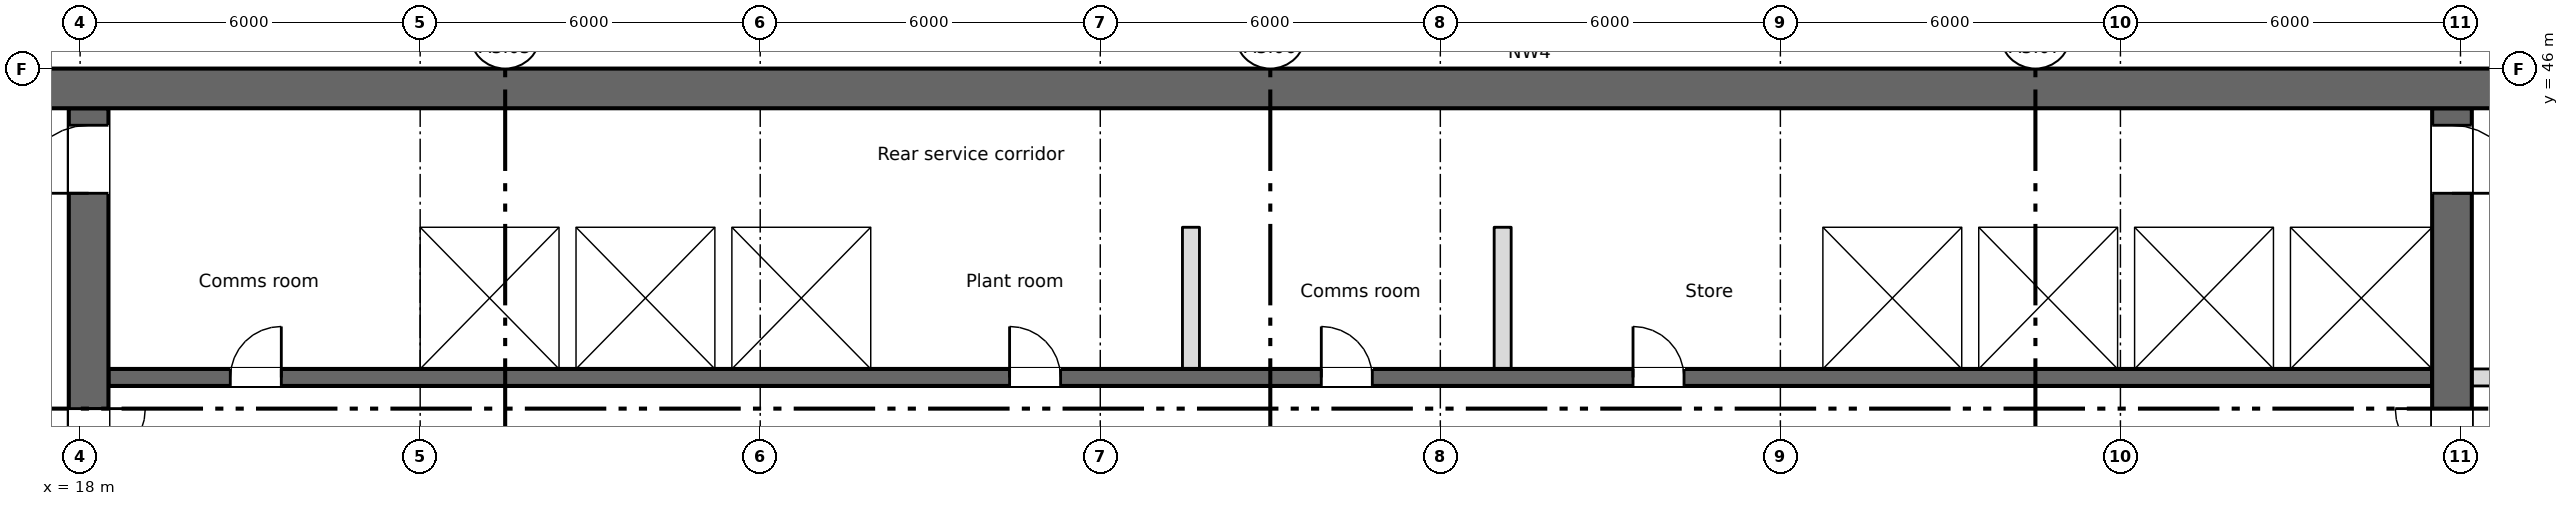
"""IFC4 building model, lengths in metres.
Left out: names, types, materials, properties, quantities, classifications, styles, units other than length and angle.
Written with IfcOpenShell. Run it as: python <this file> out.ifc"""

import sys

from ifc_helpers import new_model, si_unit, direction, frame, frame_2d, origin, place, context, subcontext, project, spatial, rectangle, extrude, element, fill, save


model = new_model("IFC4")
c1 = context("Model", 3, precision=1e-05, world=origin(), true_north=direction((0.0, 1.0)))
c2 = subcontext(c1, "Body", "Model", "MODEL_VIEW")
j1 = project(units=[si_unit("LENGTHUNIT", "METRE"), si_unit("PLANEANGLEUNIT", "RADIAN")], contexts=[c1])
p1 = place(None, origin())
s1 = spatial("IfcSite", under=j1, at=p1, CompositionType="ELEMENT")
p2 = place(p1, origin())
s2 = spatial("IfcBuilding", under=s1, at=p2, CompositionType="ELEMENT")
p3 = place(p2, frame((0.0, 0.0, 181.75)))
s3 = spatial("IfcBuildingStorey", under=s2, at=p3, CompositionType="ELEMENT", Elevation=181.75)
p4 = place(p3, frame((11.55, 45.65, 0.0), z_axis=(0.0, 0.0, 1.0), x_axis=(1.0, 0.0, 0.0)))
e1 = element("IfcWall", 1, at=p4, inside=s3, PredefinedType="SHEAR", context=c2, shape_type="SweptSolid", body=[
    extrude(rectangle(XDim=54.9, YDim=0.7, at=frame_2d((27.45, 0.0))), origin(), (0.0, 0.0, 1.0), 3.35),
])
p5 = place(p4, frame((1.2, 0.0, 0.6)))
e2 = element("IfcOpeningElement", 2, at=p5, cuts=e1, PredefinedType="OPENING", context=c2, shape_type="SweptSolid", body=[
    extrude(rectangle(XDim=0.6, YDim=2.4, at=frame_2d((0.3, 1.2))), frame((0.0, 0.36, 0.0), z_axis=(0.0, -1.0, 0.0), x_axis=(1.0, 0.0, 0.0)), (0.0, 0.0, 1.0), 0.72),
])
p6 = place(p4, frame((49.2, 0.0, 0.6)))
e3 = element("IfcOpeningElement", 3, at=p6, cuts=e1, PredefinedType="OPENING", context=c2, shape_type="SweptSolid", body=[
    extrude(rectangle(XDim=0.6, YDim=2.4, at=frame_2d((0.3, 1.2))), frame((0.0, 0.36, 0.0), z_axis=(0.0, -1.0, 0.0), x_axis=(1.0, 0.0, 0.0)), (0.0, 0.0, 1.0), 0.72),
])
p7 = place(p3, frame((18.15, 28.4, 0.0), z_axis=(0.0, 0.0, 1.0), x_axis=(0.0, 1.0, 0.0)))
e4 = element("IfcWall", 4, at=p7, inside=s3, PredefinedType="SHEAR", context=c2, shape_type="SweptSolid", body=[
    extrude(rectangle(XDim=16.9, YDim=0.7, at=frame_2d((8.45, 0.0))), origin(), (0.0, 0.0, 1.0), 3.35),
])
p8 = place(p7, frame((9.6, 0.0, 0.0)))
e5 = element("IfcOpeningElement", 5, at=p8, cuts=e4, PredefinedType="OPENING", context=c2, shape_type="SweptSolid", body=[
    extrude(rectangle(XDim=2.0, YDim=2.1, at=frame_2d((1.0, 1.05))), frame((0.0, 0.36, 0.0), z_axis=(0.0, -1.0, 0.0), x_axis=(1.0, 0.0, 0.0)), (0.0, 0.0, 1.0), 0.72),
])
p9 = place(p7, frame((15.4, 0.0, 0.0)))
e6 = element("IfcOpeningElement", 6, at=p9, cuts=e4, PredefinedType="OPENING", context=c2, shape_type="SweptSolid", body=[
    extrude(rectangle(XDim=1.2, YDim=2.1, at=frame_2d((0.6, 1.05))), frame((0.0, 0.36, 0.0), z_axis=(0.0, -1.0, 0.0), x_axis=(1.0, 0.0, 0.0)), (0.0, 0.0, 1.0), 0.72),
])
p10 = place(p3, frame((59.85, 28.4, 0.0), z_axis=(0.0, 0.0, 1.0), x_axis=(0.0, 1.0, 0.0)))
e7 = element("IfcWall", 7, at=p10, inside=s3, PredefinedType="SHEAR", context=c2, shape_type="SweptSolid", body=[
    extrude(rectangle(XDim=16.9, YDim=0.7, at=frame_2d((8.45, 0.0))), origin(), (0.0, 0.0, 1.0), 3.35),
])
p11 = place(p10, frame((9.6, 0.0, 0.0)))
e8 = element("IfcOpeningElement", 8, at=p11, cuts=e7, PredefinedType="OPENING", context=c2, shape_type="SweptSolid", body=[
    extrude(rectangle(XDim=2.0, YDim=2.1, at=frame_2d((1.0, 1.05))), frame((0.0, 0.36, 0.0), z_axis=(0.0, -1.0, 0.0), x_axis=(1.0, 0.0, 0.0)), (0.0, 0.0, 1.0), 0.72),
])
p12 = place(p10, frame((15.4, 0.0, 0.0)))
e9 = element("IfcOpeningElement", 9, at=p12, cuts=e7, PredefinedType="OPENING", context=c2, shape_type="SweptSolid", body=[
    extrude(rectangle(XDim=1.2, YDim=2.1, at=frame_2d((0.6, 1.05))), frame((0.0, 0.36, 0.0), z_axis=(0.0, -1.0, 0.0), x_axis=(1.0, 0.0, 0.0)), (0.0, 0.0, 1.0), 0.72),
])
p13 = place(p3, frame((18.5, 40.55, 0.0), z_axis=(0.0, 0.0, 1.0), x_axis=(1.0, 0.0, 0.0)))
e10 = element("IfcWall", 10, at=p13, inside=s3, PredefinedType="SHEAR", context=c2, shape_type="SweptSolid", body=[
    extrude(rectangle(XDim=41.0, YDim=0.3, at=frame_2d((20.5, 0.0))), origin(), (0.0, 0.0, 1.0), 3.35),
])
p14 = place(p13, frame((2.15, 0.0, 0.0)))
e11 = element("IfcOpeningElement", 11, at=p14, cuts=e10, PredefinedType="OPENING", context=c2, shape_type="SweptSolid", body=[
    extrude(rectangle(XDim=0.9, YDim=2.1, at=frame_2d((0.45, 1.05))), frame((0.0, 0.16, 0.0), z_axis=(0.0, -1.0, 0.0), x_axis=(1.0, 0.0, 0.0)), (0.0, 0.0, 1.0), 0.32),
])
p15 = place(p13, frame((15.9, 0.0, 0.0)))
e12 = element("IfcOpeningElement", 12, at=p15, cuts=e10, PredefinedType="OPENING", context=c2, shape_type="SweptSolid", body=[
    extrude(rectangle(XDim=0.9, YDim=2.1, at=frame_2d((0.45, 1.05))), frame((0.0, 0.16, 0.0), z_axis=(0.0, -1.0, 0.0), x_axis=(1.0, 0.0, 0.0)), (0.0, 0.0, 1.0), 0.32),
])
p16 = place(p13, frame((21.4, 0.0, 0.0)))
e13 = element("IfcOpeningElement", 13, at=p16, cuts=e10, PredefinedType="OPENING", context=c2, shape_type="SweptSolid", body=[
    extrude(rectangle(XDim=0.9, YDim=2.1, at=frame_2d((0.45, 1.05))), frame((0.0, 0.16, 0.0), z_axis=(0.0, -1.0, 0.0), x_axis=(1.0, 0.0, 0.0)), (0.0, 0.0, 1.0), 0.32),
])
p17 = place(p13, frame((26.9, 0.0, 0.0)))
e14 = element("IfcOpeningElement", 14, at=p17, cuts=e10, PredefinedType="OPENING", context=c2, shape_type="SweptSolid", body=[
    extrude(rectangle(XDim=0.9, YDim=2.1, at=frame_2d((0.45, 1.05))), frame((0.0, 0.16, 0.0), z_axis=(0.0, -1.0, 0.0), x_axis=(1.0, 0.0, 0.0)), (0.0, 0.0, 1.0), 0.32),
])
p18 = place(p13, frame((6.175, 0.0, 0.0)))
e15 = element("IfcOpeningElement", 15, at=p18, cuts=e10, PredefinedType="OPENING", context=c2, shape_type="SweptSolid", body=[
    extrude(rectangle(XDim=1.1, YDim=2.1, at=frame_2d((0.55, 1.05))), frame((0.0, 0.16, 0.0), z_axis=(0.0, -1.0, 0.0), x_axis=(1.0, 0.0, 0.0)), (0.0, 0.0, 1.0), 0.32),
])
p19 = place(p13, frame((8.925, 0.0, 0.0)))
e16 = element("IfcOpeningElement", 16, at=p19, cuts=e10, PredefinedType="OPENING", context=c2, shape_type="SweptSolid", body=[
    extrude(rectangle(XDim=1.1, YDim=2.1, at=frame_2d((0.55, 1.05))), frame((0.0, 0.16, 0.0), z_axis=(0.0, -1.0, 0.0), x_axis=(1.0, 0.0, 0.0)), (0.0, 0.0, 1.0), 0.32),
])
p20 = place(p13, frame((11.675, 0.0, 0.0)))
e17 = element("IfcOpeningElement", 17, at=p20, cuts=e10, PredefinedType="OPENING", context=c2, shape_type="SweptSolid", body=[
    extrude(rectangle(XDim=1.1, YDim=2.1, at=frame_2d((0.55, 1.05))), frame((0.0, 0.16, 0.0), z_axis=(0.0, -1.0, 0.0), x_axis=(1.0, 0.0, 0.0)), (0.0, 0.0, 1.0), 0.32),
])
p21 = place(p13, frame((30.925, 0.0, 0.0)))
e18 = element("IfcOpeningElement", 18, at=p21, cuts=e10, PredefinedType="OPENING", context=c2, shape_type="SweptSolid", body=[
    extrude(rectangle(XDim=1.1, YDim=2.1, at=frame_2d((0.55, 1.05))), frame((0.0, 0.16, 0.0), z_axis=(0.0, -1.0, 0.0), x_axis=(1.0, 0.0, 0.0)), (0.0, 0.0, 1.0), 0.32),
])
p22 = place(p13, frame((33.675, 0.0, 0.0)))
e19 = element("IfcOpeningElement", 19, at=p22, cuts=e10, PredefinedType="OPENING", context=c2, shape_type="SweptSolid", body=[
    extrude(rectangle(XDim=1.1, YDim=2.1, at=frame_2d((0.55, 1.05))), frame((0.0, 0.16, 0.0), z_axis=(0.0, -1.0, 0.0), x_axis=(1.0, 0.0, 0.0)), (0.0, 0.0, 1.0), 0.32),
])
p23 = place(p13, frame((36.375, 0.0, 0.0)))
e20 = element("IfcOpeningElement", 20, at=p23, cuts=e10, PredefinedType="OPENING", context=c2, shape_type="SweptSolid", body=[
    extrude(rectangle(XDim=1.2, YDim=2.1, at=frame_2d((0.6, 1.05))), frame((0.0, 0.16, 0.0), z_axis=(0.0, -1.0, 0.0), x_axis=(1.0, 0.0, 0.0)), (0.0, 0.0, 1.0), 0.32),
])
p24 = place(p13, frame((39.15, 0.0, 0.0)))
e21 = element("IfcOpeningElement", 21, at=p24, cuts=e10, PredefinedType="OPENING", context=c2, shape_type="SweptSolid", body=[
    extrude(rectangle(XDim=1.2, YDim=2.1, at=frame_2d((0.6, 1.05))), frame((0.0, 0.16, 0.0), z_axis=(0.0, -1.0, 0.0), x_axis=(1.0, 0.0, 0.0)), (0.0, 0.0, 1.0), 0.32),
])
p25 = place(p3, frame((18.5, 43.35, 0.0), z_axis=(0.0, 0.0, 1.0), x_axis=(1.0, 0.0, 0.0)))
e22 = element("IfcWall", 22, at=p25, inside=s3, PredefinedType="SHEAR", context=c2, shape_type="SweptSolid", body=[
    extrude(rectangle(XDim=41.0, YDim=0.3, at=frame_2d((20.5, 0.0))), origin(), (0.0, 0.0, 1.0), 3.35),
])
p26 = place(p3, frame((60.2, 40.55, 0.0), z_axis=(0.0, 0.0, 1.0), x_axis=(1.0, 0.0, 0.0)))
e23 = element("IfcWall", 23, at=p26, inside=s3, PredefinedType="PARTITIONING", context=c2, shape_type="SweptSolid", body=[
    extrude(rectangle(XDim=2.5, YDim=0.3, at=frame_2d((1.25, 0.0))), origin(), (0.0, 0.0, 1.0), 3.35),
])
p27 = place(p26, frame((0.725, 0.0, 0.0)))
e24 = element("IfcOpeningElement", 24, at=p27, cuts=e23, PredefinedType="OPENING", context=c2, shape_type="SweptSolid", body=[
    extrude(rectangle(XDim=0.9, YDim=2.1, at=frame_2d((0.45, 1.05))), frame((0.0, 0.16, 0.0), z_axis=(0.0, -1.0, 0.0), x_axis=(1.0, 0.0, 0.0)), (0.0, 0.0, 1.0), 0.32),
])
for number, where, z_axis, x_axis in (
    (25, (23.85, 40.7, 0.0), (0.0, 0.0, 1.0), (0.0, 1.0, 0.0)),
    (26, (26.6, 40.7, 0.0), (0.0, 0.0, 1.0), (0.0, 1.0, 0.0)),
    (27, (29.35, 40.7, 0.0), (0.0, 0.0, 1.0), (0.0, 1.0, 0.0)),
    (28, (32.1, 40.7, 0.0), (0.0, 0.0, 1.0), (0.0, 1.0, 0.0)),
    (29, (48.6, 40.7, 0.0), (0.0, 0.0, 1.0), (0.0, 1.0, 0.0)),
    (30, (51.35, 40.7, 0.0), (0.0, 0.0, 1.0), (0.0, 1.0, 0.0)),
    (31, (54.1, 40.7, 0.0), (0.0, 0.0, 1.0), (0.0, 1.0, 0.0)),
    (32, (56.85, 40.7, 0.0), (0.0, 0.0, 1.0), (0.0, 1.0, 0.0)),
):
    element("IfcWall", number, at=place(p3, frame(where, z_axis=z_axis, x_axis=x_axis)), inside=s3, PredefinedType="SHEAR", context=c2, shape_type="SweptSolid", body=[
        extrude(rectangle(XDim=2.5, YDim=0.3, at=frame_2d((1.25, 0.0))), origin(), (0.0, 0.0, 1.0), 3.35),
    ])
for number, where, z_axis, x_axis in (
    (33, (37.6, 40.7, 0.0), (0.0, 0.0, 1.0), (0.0, 1.0, 0.0)),
    (34, (43.1, 40.7, 0.0), (0.0, 0.0, 1.0), (0.0, 1.0, 0.0)),
):
    element("IfcWall", number, at=place(p3, frame(where, z_axis=z_axis, x_axis=x_axis)), inside=s3, PredefinedType="PARTITIONING", context=c2, shape_type="SweptSolid", body=[
        extrude(rectangle(XDim=2.5, YDim=0.3, at=frame_2d((1.25, 0.0))), origin(), (0.0, 0.0, 1.0), 3.35),
    ])
p28 = place(p14, origin())
e35 = element("IfcDoor", 35, at=p28, inside=s3, OperationType="SINGLE_SWING_RIGHT", PredefinedType="DOOR", context=c2, shape_type="SweptSolid", body=[
    extrude(rectangle(XDim=0.9, YDim=2.1, at=frame_2d((0.45, 1.05))), frame((0.0, 0.025, 0.0), z_axis=(0.0, -1.0, 0.0), x_axis=(1.0, 0.0, 0.0)), (0.0, 0.0, 1.0), 0.05),
])
fill(e11, e35)
p29 = place(p15, origin())
e36 = element("IfcDoor", 36, at=p29, inside=s3, OperationType="SINGLE_SWING_LEFT", PredefinedType="DOOR", context=c2, shape_type="SweptSolid", body=[
    extrude(rectangle(XDim=0.9, YDim=2.1, at=frame_2d((0.45, 1.05))), frame((0.0, 0.025, 0.0), z_axis=(0.0, -1.0, 0.0), x_axis=(1.0, 0.0, 0.0)), (0.0, 0.0, 1.0), 0.05),
])
fill(e12, e36)
p30 = place(p16, origin())
e37 = element("IfcDoor", 37, at=p30, inside=s3, OperationType="SINGLE_SWING_LEFT", PredefinedType="DOOR", context=c2, shape_type="SweptSolid", body=[
    extrude(rectangle(XDim=0.9, YDim=2.1, at=frame_2d((0.45, 1.05))), frame((0.0, 0.025, 0.0), z_axis=(0.0, -1.0, 0.0), x_axis=(1.0, 0.0, 0.0)), (0.0, 0.0, 1.0), 0.05),
])
fill(e13, e37)
p31 = place(p17, origin())
e38 = element("IfcDoor", 38, at=p31, inside=s3, OperationType="SINGLE_SWING_LEFT", PredefinedType="DOOR", context=c2, shape_type="SweptSolid", body=[
    extrude(rectangle(XDim=0.9, YDim=2.1, at=frame_2d((0.45, 1.05))), frame((0.0, 0.025, 0.0), z_axis=(0.0, -1.0, 0.0), x_axis=(1.0, 0.0, 0.0)), (0.0, 0.0, 1.0), 0.05),
])
fill(e14, e38)
p32 = place(p18, origin())
e39 = element("IfcDoor", 39, at=p32, inside=s3, OperationType="SLIDING_TO_LEFT", PredefinedType="DOOR", context=c2, shape_type="SweptSolid", body=[
    extrude(rectangle(XDim=1.1, YDim=2.1, at=frame_2d((0.55, 1.05))), frame((0.0, 0.025, 0.0), z_axis=(0.0, -1.0, 0.0), x_axis=(1.0, 0.0, 0.0)), (0.0, 0.0, 1.0), 0.05),
])
fill(e15, e39)
p33 = place(p19, origin())
e40 = element("IfcDoor", 40, at=p33, inside=s3, OperationType="SLIDING_TO_LEFT", PredefinedType="DOOR", context=c2, shape_type="SweptSolid", body=[
    extrude(rectangle(XDim=1.1, YDim=2.1, at=frame_2d((0.55, 1.05))), frame((0.0, 0.025, 0.0), z_axis=(0.0, -1.0, 0.0), x_axis=(1.0, 0.0, 0.0)), (0.0, 0.0, 1.0), 0.05),
])
fill(e16, e40)
p34 = place(p20, origin())
e41 = element("IfcDoor", 41, at=p34, inside=s3, OperationType="SLIDING_TO_LEFT", PredefinedType="DOOR", context=c2, shape_type="SweptSolid", body=[
    extrude(rectangle(XDim=1.1, YDim=2.1, at=frame_2d((0.55, 1.05))), frame((0.0, 0.025, 0.0), z_axis=(0.0, -1.0, 0.0), x_axis=(1.0, 0.0, 0.0)), (0.0, 0.0, 1.0), 0.05),
])
fill(e17, e41)
p35 = place(p21, origin())
e42 = element("IfcDoor", 42, at=p35, inside=s3, OperationType="SLIDING_TO_LEFT", PredefinedType="DOOR", context=c2, shape_type="SweptSolid", body=[
    extrude(rectangle(XDim=1.1, YDim=2.1, at=frame_2d((0.55, 1.05))), frame((0.0, 0.025, 0.0), z_axis=(0.0, -1.0, 0.0), x_axis=(1.0, 0.0, 0.0)), (0.0, 0.0, 1.0), 0.05),
])
fill(e18, e42)
p36 = place(p22, origin())
e43 = element("IfcDoor", 43, at=p36, inside=s3, OperationType="SLIDING_TO_LEFT", PredefinedType="DOOR", context=c2, shape_type="SweptSolid", body=[
    extrude(rectangle(XDim=1.1, YDim=2.1, at=frame_2d((0.55, 1.05))), frame((0.0, 0.025, 0.0), z_axis=(0.0, -1.0, 0.0), x_axis=(1.0, 0.0, 0.0)), (0.0, 0.0, 1.0), 0.05),
])
fill(e19, e43)
p37 = place(p23, origin())
e44 = element("IfcDoor", 44, at=p37, inside=s3, OperationType="SLIDING_TO_LEFT", PredefinedType="DOOR", context=c2, shape_type="SweptSolid", body=[
    extrude(rectangle(XDim=1.2, YDim=2.1, at=frame_2d((0.6, 1.05))), frame((0.0, 0.025, 0.0), z_axis=(0.0, -1.0, 0.0), x_axis=(1.0, 0.0, 0.0)), (0.0, 0.0, 1.0), 0.05),
])
fill(e20, e44)
p38 = place(p24, origin())
e45 = element("IfcDoor", 45, at=p38, inside=s3, OperationType="SLIDING_TO_LEFT", PredefinedType="DOOR", context=c2, shape_type="SweptSolid", body=[
    extrude(rectangle(XDim=1.2, YDim=2.1, at=frame_2d((0.6, 1.05))), frame((0.0, 0.025, 0.0), z_axis=(0.0, -1.0, 0.0), x_axis=(1.0, 0.0, 0.0)), (0.0, 0.0, 1.0), 0.05),
])
fill(e21, e45)
p39 = place(p8, origin())
e46 = element("IfcDoor", 46, at=p39, inside=s3, OperationType="DOUBLE_DOOR_SINGLE_SWING", PredefinedType="DOOR", context=c2, shape_type="SweptSolid", body=[
    extrude(rectangle(XDim=2.0, YDim=2.1, at=frame_2d((1.0, 1.05))), frame((0.0, 0.025, 0.0), z_axis=(0.0, -1.0, 0.0), x_axis=(1.0, 0.0, 0.0)), (0.0, 0.0, 1.0), 0.05),
])
fill(e5, e46)
p40 = place(p11, origin())
e47 = element("IfcDoor", 47, at=p40, inside=s3, OperationType="DOUBLE_DOOR_SINGLE_SWING", PredefinedType="DOOR", context=c2, shape_type="SweptSolid", body=[
    extrude(rectangle(XDim=2.0, YDim=2.1, at=frame_2d((1.0, 1.05))), frame((0.0, 0.025, 0.0), z_axis=(0.0, -1.0, 0.0), x_axis=(1.0, 0.0, 0.0)), (0.0, 0.0, 1.0), 0.05),
])
fill(e8, e47)
p41 = place(p9, origin())
e48 = element("IfcDoor", 48, at=p41, inside=s3, OperationType="SINGLE_SWING_LEFT", PredefinedType="DOOR", context=c2, shape_type="SweptSolid", body=[
    extrude(rectangle(XDim=1.2, YDim=2.1, at=frame_2d((0.6, 1.05))), frame((0.0, 0.025, 0.0), z_axis=(0.0, -1.0, 0.0), x_axis=(1.0, 0.0, 0.0)), (0.0, 0.0, 1.0), 0.05),
])
fill(e6, e48)
p42 = place(p12, origin())
e49 = element("IfcDoor", 49, at=p42, inside=s3, OperationType="SINGLE_SWING_LEFT", PredefinedType="DOOR", context=c2, shape_type="SweptSolid", body=[
    extrude(rectangle(XDim=1.2, YDim=2.1, at=frame_2d((0.6, 1.05))), frame((0.0, 0.025, 0.0), z_axis=(0.0, -1.0, 0.0), x_axis=(1.0, 0.0, 0.0)), (0.0, 0.0, 1.0), 0.05),
])
fill(e9, e49)
save(model, sys.argv[1])
